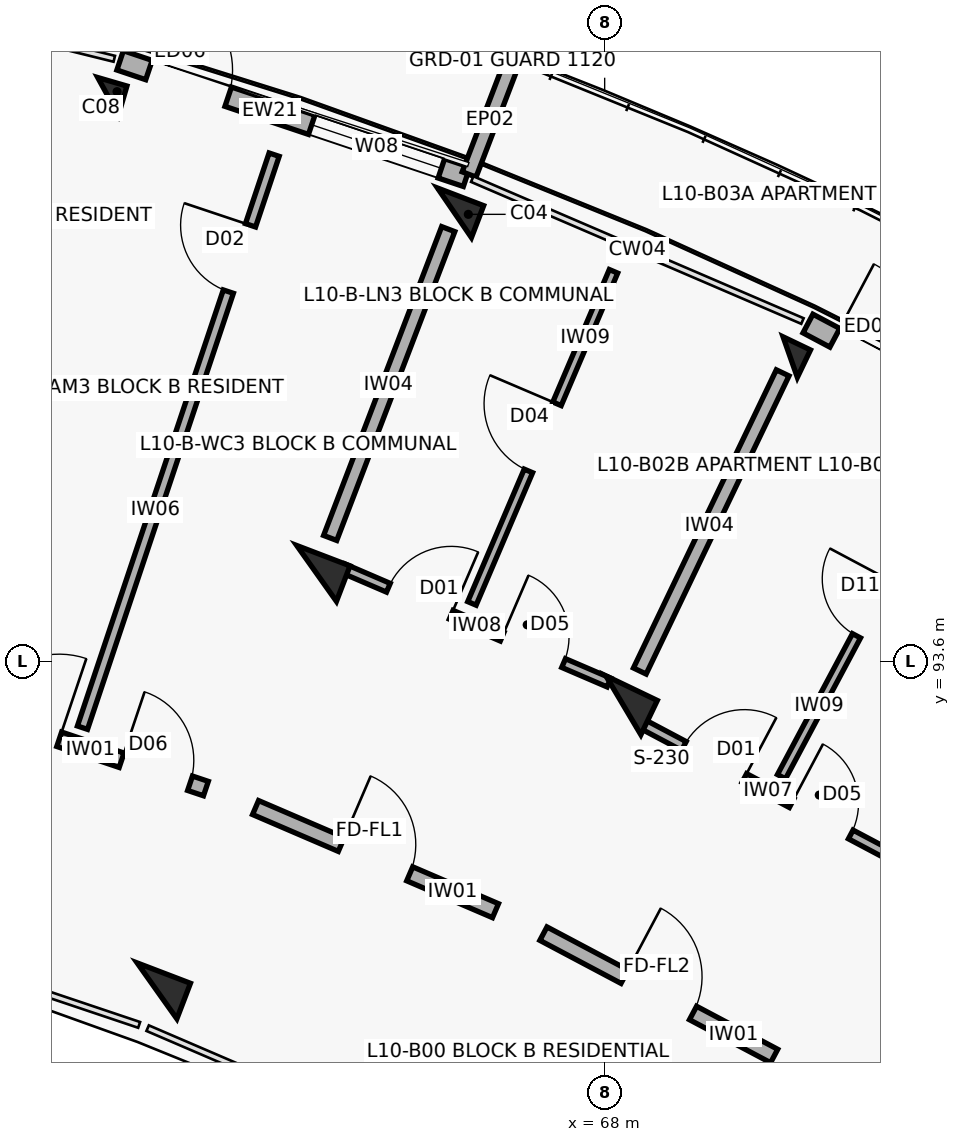
"""IFC4 building model, lengths in metres.
Left out: names, types, materials, properties, quantities, classifications, styles, units other than length and angle.
Written with IfcOpenShell. Run it as: python <this file> out.ifc"""

import sys

from ifc_helpers import new_model, si_unit, direction, frame, frame_2d, origin, origin_2d, place, context, subcontext, project, spatial, rectangle, extrude, element, fill, save


model = new_model("IFC4")
c1 = context("Model", 3, precision=1e-05, world=origin(), true_north=direction((0.0, 1.0)))
c2 = subcontext(c1, "Body", "Model", "MODEL_VIEW")
j1 = project(units=[si_unit("LENGTHUNIT", "METRE"), si_unit("PLANEANGLEUNIT", "RADIAN")], contexts=[c1])
p1 = place(None, origin())
s1 = spatial("IfcSite", under=j1, at=p1, CompositionType="ELEMENT")
p2 = place(p1, origin())
s2 = spatial("IfcBuilding", under=s1, at=p2, CompositionType="ELEMENT")
p3 = place(p2, frame((0.0, 0.0, 32.9)))
s3 = spatial("IfcBuildingStorey", under=s2, at=p3, CompositionType="ELEMENT", Elevation=32.9)
p4 = place(p3, frame((61.467, 101.031, 0.0), z_axis=(0.0, 0.0, 1.0), x_axis=(0.27966144946, 0.96009867914, 0.0)))
e1 = element("IfcColumn", 1, at=p4, inside=s3, PredefinedType="COLUMN", context=c2, shape_type="SweptSolid", body=[
    extrude(rectangle(XDim=0.4, YDim=0.4, at=origin_2d()), origin(), (0.0, 0.0, 1.0), 3.1),
])
for number, where, z_axis, x_axis in (
    (2, (62.111, 89.261, 0.0), (0.0, 0.0, 1.0), (0.357, 0.934, 0.0)),
    (3, (64.21, 94.753, 0.0), (0.0, 0.0, 1.0), (0.357, 0.934, 0.0)),
):
    element("IfcColumn", number, at=place(p3, frame(where, z_axis=z_axis, x_axis=x_axis)), inside=s3, PredefinedType="COLUMN", context=c2, shape_type="SweptSolid", body=[
        extrude(rectangle(XDim=0.5, YDim=0.75, at=origin_2d()), origin(), (0.0, 0.0, 1.0), 3.1),
    ])
p5 = place(p3, frame((66.024, 99.499, 0.0), z_axis=(0.0, 0.0, 1.0), x_axis=(0.357064076459, 0.934079892355, 0.0)))
e4 = element("IfcColumn", 4, at=p5, inside=s3, PredefinedType="COLUMN", context=c2, shape_type="SweptSolid", body=[
    extrude(rectangle(XDim=0.45, YDim=0.65, at=origin_2d()), origin(), (0.0, 0.0, 1.0), 3.1),
])
p6 = place(p3, frame((68.246, 93.019, 0.0), z_axis=(0.0, 0.0, 1.0), x_axis=(0.432085748802, 0.901832526405, 0.0)))
e5 = element("IfcColumn", 5, at=p6, inside=s3, PredefinedType="COLUMN", context=c2, shape_type="SweptSolid", body=[
    extrude(rectangle(XDim=0.5, YDim=0.75, at=origin_2d()), origin(), (0.0, 0.0, 1.0), 3.1),
])
p7 = place(p3, frame((70.441, 97.6, 0.0), z_axis=(0.0, 0.0, 1.0), x_axis=(0.432085748802, 0.901832526405, 0.0)))
e6 = element("IfcColumn", 6, at=p7, inside=s3, PredefinedType="COLUMN", context=c2, shape_type="SweptSolid", body=[
    extrude(rectangle(XDim=0.4, YDim=0.4, at=origin_2d()), origin(), (0.0, 0.0, 1.0), 3.1),
])
p8 = place(p3, frame((61.625, 101.504, 0.0), z_axis=(0.0, 0.0, 1.0), x_axis=(0.947867898788, -0.318663531717, 0.0)))
e7 = element("IfcWall", 7, at=p8, inside=s3, PredefinedType="SOLIDWALL", context=c2, shape_type="SweptSolid", body=[
    extrude(rectangle(XDim=4.809, YDim=0.268, at=frame_2d((2.405, 0.0))), origin(), (0.0, 0.0, 1.0), 2.25),
])
p9 = place(p8, frame((0.4, 0.0, 0.0)))
e8 = element("IfcOpeningElement", 8, at=p9, cuts=e7, PredefinedType="OPENING", context=c2, shape_type="SweptSolid", body=[
    extrude(rectangle(XDim=1.1, YDim=2.15, at=frame_2d((0.55, 1.075))), frame((0.0, 0.144, 0.0), z_axis=(0.0, -1.0, 0.0), x_axis=(1.0, 0.0, 0.0)), (0.0, 0.0, 1.0), 0.288),
])
p10 = place(p8, frame((2.659, 0.0, 0.35)))
e9 = element("IfcOpeningElement", 9, at=p10, cuts=e7, PredefinedType="OPENING", context=c2, shape_type="SweptSolid", body=[
    extrude(rectangle(XDim=1.8, YDim=1.65, at=frame_2d((0.9, 0.825))), frame((0.0, 0.144, 0.0), z_axis=(0.0, -1.0, 0.0), x_axis=(1.0, 0.0, 0.0)), (0.0, 0.0, 1.0), 0.288),
])
p11 = place(p3, frame((66.217, 100.003, 0.0), z_axis=(0.0, 0.0, 1.0), x_axis=(0.356957296461, 0.934120703391, 0.0)))
e10 = element("IfcWall", 10, at=p11, inside=s3, PredefinedType="PARAPET", context=c2, shape_type="SweptSolid", body=[
    extrude(rectangle(XDim=1.53, YDim=0.195, at=frame_2d((0.765, 0.0))), origin(), (0.0, 0.0, 1.0), 2.25),
])
p12 = place(p3, frame((70.675, 98.042, 0.0), z_axis=(0.0, 0.0, 1.0), x_axis=(0.883448093208, -0.468529045639, 0.0)))
e11 = element("IfcWall", 11, at=p12, inside=s3, PredefinedType="SOLIDWALL", context=c2, shape_type="SweptSolid", body=[
    extrude(rectangle(XDim=4.809, YDim=0.278, at=frame_2d((2.405, 0.0))), origin(), (0.0, 0.0, 1.0), 2.25),
])
p13 = place(p12, frame((0.4, 0.0, 0.0)))
e12 = element("IfcOpeningElement", 12, at=p13, cuts=e11, PredefinedType="OPENING", context=c2, shape_type="SweptSolid", body=[
    extrude(rectangle(XDim=1.1, YDim=2.15, at=frame_2d((0.55, 1.075))), frame((0.0, 0.149, 0.0), z_axis=(0.0, -1.0, 0.0), x_axis=(1.0, 0.0, 0.0)), (0.0, 0.0, 1.0), 0.298),
])
p14 = place(p12, frame((2.659, 0.0, 0.35)))
e13 = element("IfcOpeningElement", 13, at=p14, cuts=e11, PredefinedType="OPENING", context=c2, shape_type="SweptSolid", body=[
    extrude(rectangle(XDim=1.8, YDim=1.65, at=frame_2d((0.9, 0.825))), frame((0.0, 0.149, 0.0), z_axis=(0.0, -1.0, 0.0), x_axis=(1.0, 0.0, 0.0)), (0.0, 0.0, 1.0), 0.298),
])
p15 = place(p3, frame((59.497, 93.018, 0.0), z_axis=(0.0, 0.0, 1.0), x_axis=(0.947863007629, -0.318678080151, 0.0)))
e14 = element("IfcWall", 14, at=p15, inside=s3, PredefinedType="SOLIDWALL", context=c2, shape_type="SweptSolid", body=[
    extrude(rectangle(XDim=3.436, YDim=0.2, at=frame_2d((1.718, 0.0))), origin(), (0.0, 0.0, 1.0), 2.08),
])
p16 = place(p15, frame((0.28, 0.0, 0.0)))
e15 = element("IfcOpeningElement", 15, at=p16, cuts=e14, PredefinedType="OPENING", context=c2, shape_type="SweptSolid", body=[
    extrude(rectangle(XDim=1.12, YDim=2.15, at=frame_2d((0.56, 1.075))), frame((0.0, 0.11, 0.0), z_axis=(0.0, -1.0, 0.0), x_axis=(1.0, 0.0, 0.0)), (0.0, 0.0, 1.0), 0.22),
])
p17 = place(p15, frame((2.266, 0.0, 0.0)))
e16 = element("IfcOpeningElement", 16, at=p17, cuts=e14, PredefinedType="OPENING", context=c2, shape_type="SweptSolid", body=[
    extrude(rectangle(XDim=0.95, YDim=2.1, at=frame_2d((0.475, 1.05))), frame((0.0, 0.11, 0.0), z_axis=(0.0, -1.0, 0.0), x_axis=(1.0, 0.0, 0.0)), (0.0, 0.0, 1.0), 0.22),
])
p18 = place(p3, frame((61.13, 92.724, 0.0), z_axis=(0.0, 0.0, 1.0), x_axis=(0.317204178278, 0.948357268798, 0.0)))
e17 = element("IfcWall", 17, at=p18, inside=s3, PredefinedType="PARTITIONING", context=c2, shape_type="SweptSolid", body=[
    extrude(rectangle(XDim=7.95, YDim=0.14, at=frame_2d((3.975, 0.0))), origin(), (0.0, 0.0, 1.0), 2.08),
])
p19 = place(p18, frame((6.05, 0.0, 0.0)))
e18 = element("IfcOpeningElement", 18, at=p19, cuts=e17, PredefinedType="OPENING", context=c2, shape_type="SweptSolid", body=[
    extrude(rectangle(XDim=0.92, YDim=2.1, at=frame_2d((0.46, 1.05))), frame((0.0, 0.08, 0.0), z_axis=(0.0, -1.0, 0.0), x_axis=(1.0, 0.0, 0.0)), (0.0, 0.0, 1.0), 0.16),
])
p20 = place(p3, frame((63.407, 91.673, 0.0), z_axis=(0.0, 0.0, 1.0), x_axis=(0.918718172399, -0.394913813008, 0.0)))
e19 = element("IfcWall", 19, at=p20, inside=s3, PredefinedType="SOLIDWALL", context=c2, shape_type="SweptSolid", body=[
    extrude(rectangle(XDim=3.436, YDim=0.2, at=frame_2d((1.718, 0.0))), origin(), (0.0, 0.0, 1.0), 2.08),
])
p21 = place(p20, frame((1.228, 0.0, 0.0)))
e20 = element("IfcOpeningElement", 20, at=p21, cuts=e19, PredefinedType="OPENING", context=c2, shape_type="SweptSolid", body=[
    extrude(rectangle(XDim=0.98, YDim=2.15, at=frame_2d((0.49, 1.075))), frame((0.0, 0.11, 0.0), z_axis=(0.0, -1.0, 0.0), x_axis=(1.0, 0.0, 0.0)), (0.0, 0.0, 1.0), 0.22),
])
p22 = place(p3, frame((64.557, 94.822, 0.0), z_axis=(0.0, 0.0, 1.0), x_axis=(0.918726854017, -0.394893615684, 0.0)))
e21 = element("IfcWall", 21, at=p22, inside=s3, PredefinedType="PARTITIONING", context=c2, shape_type="SweptSolid", body=[
    extrude(rectangle(XDim=3.81, YDim=0.125, at=frame_2d((1.905, 0.0))), origin(), (0.0, 0.0, 1.0), 2.08),
])
p23 = place(p22, frame((0.65, 0.0, 0.0)))
e22 = element("IfcOpeningElement", 22, at=p23, cuts=e21, PredefinedType="OPENING", context=c2, shape_type="SweptSolid", body=[
    extrude(rectangle(XDim=0.9, YDim=2.1, at=frame_2d((0.45, 1.05))), frame((0.0, 0.073, 0.0), z_axis=(0.0, -1.0, 0.0), x_axis=(1.0, 0.0, 0.0)), (0.0, 0.0, 1.0), 0.145),
])
p24 = place(p22, frame((2.28, 0.0, 0.0)))
e23 = element("IfcOpeningElement", 23, at=p24, cuts=e21, PredefinedType="OPENING", context=c2, shape_type="SweptSolid", body=[
    extrude(rectangle(XDim=0.88, YDim=2.1, at=frame_2d((0.44, 1.05))), frame((0.0, 0.073, 0.0), z_axis=(0.0, -1.0, 0.0), x_axis=(1.0, 0.0, 0.0)), (0.0, 0.0, 1.0), 0.145),
])
p25 = place(p3, frame((66.253, 94.359, 0.0), z_axis=(0.0, 0.0, 1.0), x_axis=(0.392156908456, 0.919898341748, 0.0)))
e24 = element("IfcWall", 24, at=p25, inside=s3, PredefinedType="PARTITIONING", context=c2, shape_type="SweptSolid", body=[
    extrude(rectangle(XDim=4.75, YDim=0.12, at=frame_2d((2.375, 0.0))), origin(), (0.0, 0.0, 1.0), 2.08),
])
p26 = place(p25, frame((1.895, 0.0, 0.0)))
e25 = element("IfcOpeningElement", 25, at=p26, cuts=e24, PredefinedType="OPENING", context=c2, shape_type="SweptSolid", body=[
    extrude(rectangle(XDim=0.96, YDim=2.1, at=frame_2d((0.48, 1.05))), frame((0.0, 0.07, 0.0), z_axis=(0.0, -1.0, 0.0), x_axis=(1.0, 0.0, 0.0)), (0.0, 0.0, 1.0), 0.14),
])
p27 = place(p3, frame((64.389, 95.22, 0.0), z_axis=(0.0, 0.0, 1.0), x_axis=(0.357064016205, 0.934079915388, 0.0)))
e26 = element("IfcWall", 26, at=p27, inside=s3, PredefinedType="SOLIDWALL", context=c2, shape_type="SweptSolid", body=[
    extrude(rectangle(XDim=4.35, YDim=0.185, at=frame_2d((2.175, 0.0))), origin(), (0.0, 0.0, 1.0), 2.08),
])
p28 = place(p3, frame((67.194, 90.014, 0.0), z_axis=(0.0, 0.0, 1.0), x_axis=(0.883410853063, -0.468599258099, 0.0)))
e27 = element("IfcWall", 27, at=p28, inside=s3, PredefinedType="SOLIDWALL", context=c2, shape_type="SweptSolid", body=[
    extrude(rectangle(XDim=3.436, YDim=0.2, at=frame_2d((1.718, 0.0))), origin(), (0.0, 0.0, 1.0), 2.08),
])
p29 = place(p28, frame((1.208, 0.0, 0.0)))
e28 = element("IfcOpeningElement", 28, at=p29, cuts=e27, PredefinedType="OPENING", context=c2, shape_type="SweptSolid", body=[
    extrude(rectangle(XDim=1.02, YDim=2.15, at=frame_2d((0.51, 1.075))), frame((0.0, 0.11, 0.0), z_axis=(0.0, -1.0, 0.0), x_axis=(1.0, 0.0, 0.0)), (0.0, 0.0, 1.0), 0.22),
])
p30 = place(p3, frame((68.468, 92.788, 0.0), z_axis=(0.0, 0.0, 1.0), x_axis=(0.883450371448, -0.468524749814, 0.0)))
e29 = element("IfcWall", 29, at=p30, inside=s3, PredefinedType="PARTITIONING", context=c2, shape_type="SweptSolid", body=[
    extrude(rectangle(XDim=3.785, YDim=0.13, at=frame_2d((1.893, 0.0))), origin(), (0.0, 0.0, 1.0), 2.08),
])
p31 = place(p30, frame((0.65, 0.0, 0.0)))
e30 = element("IfcOpeningElement", 30, at=p31, cuts=e29, PredefinedType="OPENING", context=c2, shape_type="SweptSolid", body=[
    extrude(rectangle(XDim=0.9, YDim=2.1, at=frame_2d((0.45, 1.05))), frame((0.0, 0.075, 0.0), z_axis=(0.0, -1.0, 0.0), x_axis=(1.0, 0.0, 0.0)), (0.0, 0.0, 1.0), 0.15),
])
p32 = place(p30, frame((2.255, 0.0, 0.0)))
e31 = element("IfcOpeningElement", 31, at=p32, cuts=e29, PredefinedType="OPENING", context=c2, shape_type="SweptSolid", body=[
    extrude(rectangle(XDim=0.88, YDim=2.1, at=frame_2d((0.44, 1.05))), frame((0.0, 0.075, 0.0), z_axis=(0.0, -1.0, 0.0), x_axis=(1.0, 0.0, 0.0)), (0.0, 0.0, 1.0), 0.15),
])
p33 = place(p3, frame((70.326, 92.079, 0.0), z_axis=(0.0, 0.0, 1.0), x_axis=(0.469847866249, 0.882747405876, 0.0)))
e32 = element("IfcWall", 32, at=p33, inside=s3, PredefinedType="PARTITIONING", context=c2, shape_type="SweptSolid", body=[
    extrude(rectangle(XDim=5.05, YDim=0.12, at=frame_2d((2.525, 0.0))), origin(), (0.0, 0.0, 1.0), 2.08),
])
p34 = place(p33, frame((2.1, 0.0, 0.0)))
e33 = element("IfcOpeningElement", 33, at=p34, cuts=e32, PredefinedType="OPENING", context=c2, shape_type="SweptSolid", body=[
    extrude(rectangle(XDim=0.85, YDim=2.1, at=frame_2d((0.425, 1.05))), frame((0.0, 0.07, 0.0), z_axis=(0.0, -1.0, 0.0), x_axis=(1.0, 0.0, 0.0)), (0.0, 0.0, 1.0), 0.14),
])
p35 = place(p3, frame((68.462, 93.469, 0.0), z_axis=(0.0, 0.0, 1.0), x_axis=(0.432086898897, 0.901831975371, 0.0)))
e34 = element("IfcWall", 34, at=p35, inside=s3, PredefinedType="SOLIDWALL", context=c2, shape_type="SweptSolid", body=[
    extrude(rectangle(XDim=4.35, YDim=0.185, at=frame_2d((2.175, 0.0))), origin(), (0.0, 0.0, 1.0), 2.08),
])
p36 = place(p9, origin())
e35 = element("IfcDoor", 35, at=p36, inside=s3, OperationType="SINGLE_SWING_LEFT", PredefinedType="DOOR", context=c2, shape_type="SweptSolid", body=[
    extrude(rectangle(XDim=1.1, YDim=2.15, at=frame_2d((0.55, 1.075))), frame((0.0, 0.025, 0.0), z_axis=(0.0, -1.0, 0.0), x_axis=(1.0, 0.0, 0.0)), (0.0, 0.0, 1.0), 0.05),
])
fill(e8, e35)
p37 = place(p10, origin())
e36 = element("IfcWindow", 36, at=p37, inside=s3, PartitioningType="TRIPLE_PANEL_VERTICAL", PredefinedType="WINDOW", context=c2, shape_type="SweptSolid", body=[
    extrude(rectangle(XDim=1.8, YDim=1.65, at=frame_2d((0.9, 0.825))), frame((0.0, 0.03, 0.0), z_axis=(0.0, -1.0, 0.0), x_axis=(1.0, 0.0, 0.0)), (0.0, 0.0, 1.0), 0.06),
])
fill(e9, e36)
p38 = place(p13, origin())
e37 = element("IfcDoor", 37, at=p38, inside=s3, OperationType="SINGLE_SWING_LEFT", PredefinedType="DOOR", context=c2, shape_type="SweptSolid", body=[
    extrude(rectangle(XDim=1.1, YDim=2.15, at=frame_2d((0.55, 1.075))), frame((0.0, 0.025, 0.0), z_axis=(0.0, -1.0, 0.0), x_axis=(1.0, 0.0, 0.0)), (0.0, 0.0, 1.0), 0.05),
])
fill(e12, e37)
p39 = place(p16, origin())
e38 = element("IfcDoor", 38, at=p39, inside=s3, OperationType="SINGLE_SWING_RIGHT", PredefinedType="DOOR", context=c2, shape_type="SweptSolid", body=[
    extrude(rectangle(XDim=1.12, YDim=2.15, at=frame_2d((0.56, 1.075))), frame((0.0, 0.025, 0.0), z_axis=(0.0, -1.0, 0.0), x_axis=(1.0, 0.0, 0.0)), (0.0, 0.0, 1.0), 0.05),
])
fill(e15, e38)
p40 = place(p17, origin())
e39 = element("IfcDoor", 39, at=p40, inside=s3, OperationType="SINGLE_SWING_LEFT", PredefinedType="DOOR", context=c2, shape_type="SweptSolid", body=[
    extrude(rectangle(XDim=0.95, YDim=2.1, at=frame_2d((0.475, 1.05))), frame((0.0, 0.025, 0.0), z_axis=(0.0, -1.0, 0.0), x_axis=(1.0, 0.0, 0.0)), (0.0, 0.0, 1.0), 0.05),
])
fill(e16, e39)
p41 = place(p19, origin())
e40 = element("IfcDoor", 40, at=p41, inside=s3, OperationType="SINGLE_SWING_RIGHT", PredefinedType="DOOR", context=c2, shape_type="SweptSolid", body=[
    extrude(rectangle(XDim=0.92, YDim=2.1, at=frame_2d((0.46, 1.05))), frame((0.0, 0.025, 0.0), z_axis=(0.0, -1.0, 0.0), x_axis=(1.0, 0.0, 0.0)), (0.0, 0.0, 1.0), 0.05),
])
fill(e18, e40)
p42 = place(p21, origin())
e41 = element("IfcDoor", 41, at=p42, inside=s3, OperationType="SINGLE_SWING_LEFT", PredefinedType="DOOR", context=c2, shape_type="SweptSolid", body=[
    extrude(rectangle(XDim=0.98, YDim=2.15, at=frame_2d((0.49, 1.075))), frame((0.0, 0.025, 0.0), z_axis=(0.0, -1.0, 0.0), x_axis=(1.0, 0.0, 0.0)), (0.0, 0.0, 1.0), 0.05),
])
fill(e20, e41)
p43 = place(p23, origin())
e42 = element("IfcDoor", 42, at=p43, inside=s3, OperationType="SINGLE_SWING_RIGHT", PredefinedType="DOOR", context=c2, shape_type="SweptSolid", body=[
    extrude(rectangle(XDim=0.9, YDim=2.1, at=frame_2d((0.45, 1.05))), frame((0.0, 0.025, 0.0), z_axis=(0.0, -1.0, 0.0), x_axis=(1.0, 0.0, 0.0)), (0.0, 0.0, 1.0), 0.05),
])
fill(e22, e42)
p44 = place(p24, origin())
e43 = element("IfcDoor", 43, at=p44, inside=s3, OperationType="SINGLE_SWING_LEFT", PredefinedType="DOOR", context=c2, shape_type="SweptSolid", body=[
    extrude(rectangle(XDim=0.88, YDim=2.1, at=frame_2d((0.44, 1.05))), frame((0.0, 0.025, 0.0), z_axis=(0.0, -1.0, 0.0), x_axis=(1.0, 0.0, 0.0)), (0.0, 0.0, 1.0), 0.05),
])
fill(e23, e43)
p45 = place(p26, origin())
e44 = element("IfcDoor", 44, at=p45, inside=s3, OperationType="SINGLE_SWING_RIGHT", PredefinedType="DOOR", context=c2, shape_type="SweptSolid", body=[
    extrude(rectangle(XDim=0.96, YDim=2.1, at=frame_2d((0.48, 1.05))), frame((0.0, 0.025, 0.0), z_axis=(0.0, -1.0, 0.0), x_axis=(1.0, 0.0, 0.0)), (0.0, 0.0, 1.0), 0.05),
])
fill(e25, e44)
p46 = place(p29, origin())
e45 = element("IfcDoor", 45, at=p46, inside=s3, OperationType="SINGLE_SWING_LEFT", PredefinedType="DOOR", context=c2, shape_type="SweptSolid", body=[
    extrude(rectangle(XDim=1.02, YDim=2.15, at=frame_2d((0.51, 1.075))), frame((0.0, 0.025, 0.0), z_axis=(0.0, -1.0, 0.0), x_axis=(1.0, 0.0, 0.0)), (0.0, 0.0, 1.0), 0.05),
])
fill(e28, e45)
p47 = place(p31, origin())
e46 = element("IfcDoor", 46, at=p47, inside=s3, OperationType="SINGLE_SWING_RIGHT", PredefinedType="DOOR", context=c2, shape_type="SweptSolid", body=[
    extrude(rectangle(XDim=0.9, YDim=2.1, at=frame_2d((0.45, 1.05))), frame((0.0, 0.025, 0.0), z_axis=(0.0, -1.0, 0.0), x_axis=(1.0, 0.0, 0.0)), (0.0, 0.0, 1.0), 0.05),
])
fill(e30, e46)
p48 = place(p32, origin())
e47 = element("IfcDoor", 47, at=p48, inside=s3, OperationType="SINGLE_SWING_LEFT", PredefinedType="DOOR", context=c2, shape_type="SweptSolid", body=[
    extrude(rectangle(XDim=0.88, YDim=2.1, at=frame_2d((0.44, 1.05))), frame((0.0, 0.025, 0.0), z_axis=(0.0, -1.0, 0.0), x_axis=(1.0, 0.0, 0.0)), (0.0, 0.0, 1.0), 0.05),
])
fill(e31, e47)
p49 = place(p34, origin())
e48 = element("IfcDoor", 48, at=p49, inside=s3, OperationType="SINGLE_SWING_RIGHT", PredefinedType="DOOR", context=c2, shape_type="SweptSolid", body=[
    extrude(rectangle(XDim=0.85, YDim=2.1, at=frame_2d((0.425, 1.05))), frame((0.0, 0.025, 0.0), z_axis=(0.0, -1.0, 0.0), x_axis=(1.0, 0.0, 0.0)), (0.0, 0.0, 1.0), 0.05),
])
fill(e33, e48)
save(model, sys.argv[1])
